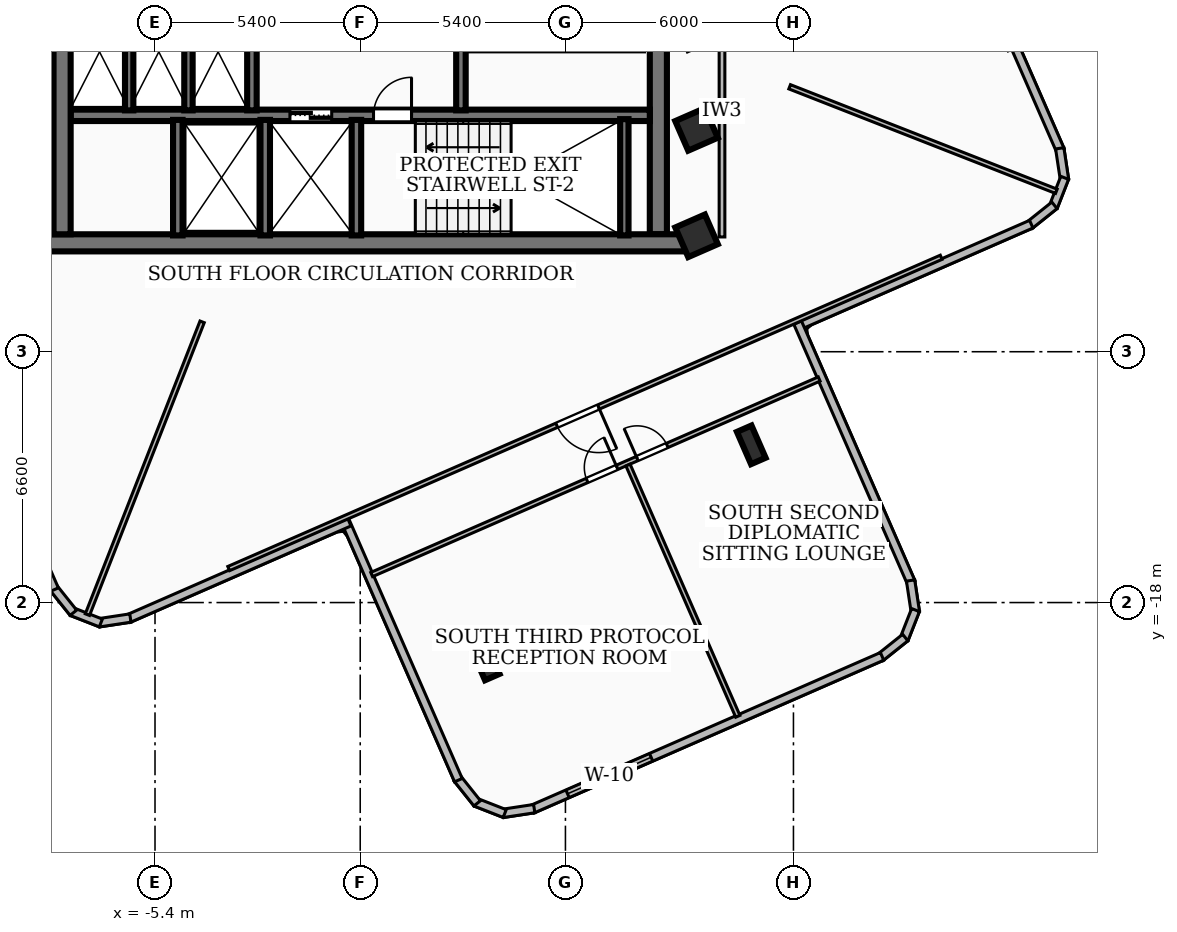
"""IFC4 building model, lengths in metres.
Left out: names, types, materials, properties, quantities, classifications, styles, units other than length and angle.
Written with IfcOpenShell. Run it as: python <this file> out.ifc"""

import sys

from ifc_helpers import new_model, si_unit, direction, frame, frame_2d, origin, origin_2d, place, context, subcontext, project, spatial, rectangle, i_section, extrude, element, fill, save


model = new_model("IFC4")
c1 = context("Model", 3, precision=1e-05, world=origin(), true_north=direction((0.0, 1.0)))
c2 = subcontext(c1, "Body", "Model", "MODEL_VIEW")
j1 = project(units=[si_unit("LENGTHUNIT", "METRE"), si_unit("PLANEANGLEUNIT", "RADIAN")], contexts=[c1])
p1 = place(None, origin())
s1 = spatial("IfcSite", under=j1, at=p1, CompositionType="ELEMENT")
p2 = place(p1, origin())
s2 = spatial("IfcBuilding", under=s1, at=p2, CompositionType="ELEMENT")
p3 = place(p2, frame((0.0, 0.0, 181.08)))
s3 = spatial("IfcBuildingStorey", under=s2, at=p3, CompositionType="ELEMENT", Elevation=181.08)
p4 = place(p3, frame((8.78, -8.535, 0.0), z_axis=(0.0, 0.0, 1.0), x_axis=(-1.0, 0.0, 0.0)))
e1 = element("IfcWall", 1, at=p4, inside=s3, PredefinedType="SHEAR", context=c2, shape_type="SweptSolid", body=[
    extrude(rectangle(XDim=17.56, YDim=0.45, at=frame_2d((8.78, 0.0))), origin(), (0.0, 0.0, 1.0), 3.34),
])
for number, where, z_axis, x_axis in (
    (2, (-7.845, -8.31, 0.0), (0.0, 0.0, 1.0), (0.0, 1.0, 0.0)),
    (3, (7.845, -1.975, 0.0), (0.0, 0.0, 1.0), (0.0, -1.0, 0.0)),
):
    element("IfcWall", number, at=place(p3, frame(where, z_axis=z_axis, x_axis=x_axis)), inside=s3, PredefinedType="SHEAR", context=c2, shape_type="SweptSolid", body=[
        extrude(rectangle(XDim=6.335, YDim=0.45, at=frame_2d((3.167, 0.0))), origin(), (0.0, 0.0, 1.0), 3.34),
    ])
p5 = place(p3, frame((-7.62, -5.18, 0.0), z_axis=(0.0, 0.0, 1.0), x_axis=(1.0, 0.0, 0.0)))
e4 = element("IfcWall", 4, at=p5, inside=s3, PredefinedType="SOLIDWALL", context=c2, shape_type="SweptSolid", body=[
    extrude(rectangle(XDim=15.24, YDim=0.3, at=frame_2d((7.62, 0.0))), origin(), (0.0, 0.0, 1.0), 3.34),
])
p6 = place(p5, frame((5.77, 0.0, 0.0)))
e5 = element("IfcOpeningElement", 5, at=p6, cuts=e4, PredefinedType="OPENING", context=c2, shape_type="SweptSolid", body=[
    extrude(rectangle(XDim=1.1, YDim=2.15, at=frame_2d((0.55, 1.075))), frame((0.0, 0.16, 0.0), z_axis=(0.0, -1.0, 0.0), x_axis=(1.0, 0.0, 0.0)), (0.0, 0.0, 1.0), 0.32),
])
p7 = place(p5, frame((7.97, 0.0, 0.0)))
e6 = element("IfcOpeningElement", 6, at=p7, cuts=e4, PredefinedType="OPENING", context=c2, shape_type="SweptSolid", body=[
    extrude(rectangle(XDim=1.0, YDim=2.1, at=frame_2d((0.5, 1.05))), frame((0.0, 0.16, 0.0), z_axis=(0.0, -1.0, 0.0), x_axis=(1.0, 0.0, 0.0)), (0.0, 0.0, 1.0), 0.32),
])
p8 = place(p3, frame((6.95, -8.34, 0.0), z_axis=(0.0, 0.0, 1.0), x_axis=(0.0, 1.0, 0.0)))
e7 = element("IfcWall", 7, at=p8, inside=s3, PredefinedType="SOLIDWALL", context=c2, shape_type="SweptSolid", body=[
    extrude(rectangle(XDim=3.06, YDim=0.22, at=frame_2d((1.53, 0.0))), origin(), (0.0, 0.0, 1.0), 3.34),
])
for number, where, z_axis, x_axis in (
    (8, (-0.1, -8.34, 0.0), (0.0, 0.0, 1.0), (0.0, 1.0, 0.0)),
    (9, (-2.5, -8.34, 0.0), (0.0, 0.0, 1.0), (0.0, 1.0, 0.0)),
    (10, (-4.8, -8.34, 0.0), (0.0, 0.0, 1.0), (0.0, 1.0, 0.0)),
):
    element("IfcWall", number, at=place(p3, frame(where, z_axis=z_axis, x_axis=x_axis)), inside=s3, PredefinedType="SOLIDWALL", context=c2, shape_type="SweptSolid", body=[
        extrude(rectangle(XDim=3.04, YDim=0.25, at=frame_2d((1.52, 0.0))), origin(), (0.0, 0.0, 1.0), 3.34),
    ])
for number, where, z_axis, x_axis in (
    (11, (-2.85, -5.05, 0.0), (0.0, 0.0, 1.0), (0.0, 1.0, 0.0)),
    (12, (2.65, -5.05, 0.0), (0.0, 0.0, 1.0), (0.0, 1.0, 0.0)),
):
    element("IfcWall", number, at=place(p3, frame(where, z_axis=z_axis, x_axis=x_axis)), inside=s3, PredefinedType="SOLIDWALL", context=c2, shape_type="SweptSolid", body=[
        extrude(rectangle(XDim=3.07, YDim=0.25, at=frame_2d((1.535, 0.0))), origin(), (0.0, 0.0, 1.0), 3.34),
    ])
for number, where, z_axis, x_axis in (
    (13, (-6.08, -5.05, 0.0), (0.0, 0.0, 1.0), (0.0, 1.0, 0.0)),
    (14, (-4.52, -5.05, 0.0), (0.0, 0.0, 1.0), (0.0, 1.0, 0.0)),
):
    element("IfcWall", number, at=place(p3, frame(where, z_axis=z_axis, x_axis=x_axis)), inside=s3, PredefinedType="SOLIDWALL", context=c2, shape_type="SweptSolid", body=[
        extrude(rectangle(XDim=3.07, YDim=0.22, at=frame_2d((1.535, 0.0))), origin(), (0.0, 0.0, 1.0), 3.34),
    ])
for number, where, z_axis, x_axis in (
    (15, (8.85, -5.55, 0.0), (0.0, 0.0, 1.0), (0.916, 0.4, 0.0)),
    (16, (8.85, -8.35, 0.0), (0.0, 0.0, 1.0), (0.916, 0.4, 0.0)),
):
    element("IfcColumn", number, at=place(p3, frame(where, z_axis=z_axis, x_axis=x_axis)), inside=s3, PredefinedType="COLUMN", context=c2, shape_type="SweptSolid", body=[
        extrude(rectangle(XDim=0.85, YDim=0.85, at=origin_2d()), origin(), (0.0, 0.0, 1.0), 3.6),
    ])
for number, where, z_axis, x_axis in (
    (17, (3.29, -19.536, 0.0), (0.0, 0.0, 1.0), (0.916, 0.4, 0.0)),
    (18, (10.29, -13.85, 0.0), (0.0, 0.0, 1.0), (0.916, 0.4, 0.0)),
):
    element("IfcColumn", number, at=place(p3, frame(where, z_axis=z_axis, x_axis=x_axis)), inside=s3, PredefinedType="COLUMN", context=c2, shape_type="SweptSolid", body=[
        extrude(i_section(OverallWidth=0.418, OverallDepth=0.927, WebThickness=0.019, FlangeThickness=0.032, at=origin_2d()), origin(), (0.0, 0.0, 1.0), 3.6),
    ])
p9 = place(p3, frame((15.883, -0.287, 0.0), z_axis=(0.0, 0.0, 1.0), x_axis=(0.400352069216, -0.916361402872, 0.0)))
e19 = element("IfcWall", 19, at=p9, inside=s3, PredefinedType="SOLIDWALL", context=c2, shape_type="SweptSolid", body=[
    extrude(rectangle(XDim=6.339, YDim=0.22, at=frame_2d((3.169, 0.0))), origin(), (0.0, 0.0, 1.0), 3.34),
])
p10 = place(p3, frame((18.407, -6.048, 0.0), z_axis=(0.0, 0.0, 1.0), x_axis=(0.149814047271, -0.988714190876, 0.0)))
e20 = element("IfcWall", 20, at=p10, inside=s3, PredefinedType="SOLIDWALL", context=c2, shape_type="SweptSolid", body=[
    extrude(rectangle(XDim=0.834, YDim=0.22, at=frame_2d((0.417, 0.0))), origin(), (0.0, 0.0, 1.0), 3.34),
])
p11 = place(p3, frame((18.537, -6.825, 0.0), z_axis=(0.0, 0.0, 1.0), x_axis=(-0.364331843435, -0.931269191941, 0.0)))
e21 = element("IfcWall", 21, at=p11, inside=s3, PredefinedType="SOLIDWALL", context=c2, shape_type="SweptSolid", body=[
    extrude(rectangle(XDim=0.818, YDim=0.22, at=frame_2d((0.409, 0.0))), origin(), (0.0, 0.0, 1.0), 3.34),
])
p12 = place(p3, frame((18.268, -7.548, 0.0), z_axis=(0.0, 0.0, 1.0), x_axis=(-0.781153625844, -0.624338860581, 0.0)))
e22 = element("IfcWall", 22, at=p12, inside=s3, PredefinedType="SOLIDWALL", context=c2, shape_type="SweptSolid", body=[
    extrude(rectangle(XDim=0.836, YDim=0.22, at=frame_2d((0.418, 0.0))), origin(), (0.0, 0.0, 1.0), 3.34),
])
p13 = place(p3, frame((17.658, -8.044, 0.0), z_axis=(0.0, 0.0, 1.0), x_axis=(-0.916361145567, -0.400352658158, 0.0)))
e23 = element("IfcWall", 23, at=p13, inside=s3, PredefinedType="SOLIDWALL", context=c2, shape_type="SweptSolid", body=[
    extrude(rectangle(XDim=6.759, YDim=0.22, at=frame_2d((3.38, 0.0))), origin(), (0.0, 0.0, 1.0), 3.34),
])
p14 = place(p3, frame((11.51, -10.634, 0.0), z_axis=(0.0, 0.0, 1.0), x_axis=(0.400392901903, -0.916343562266, 0.0)))
e24 = element("IfcWall", 24, at=p14, inside=s3, PredefinedType="SOLIDWALL", context=c2, shape_type="SweptSolid", body=[
    extrude(rectangle(XDim=7.458, YDim=0.22, at=frame_2d((3.729, 0.0))), origin(), (0.0, 0.0, 1.0), 3.34),
])
p15 = place(p3, frame((14.482, -17.42, 0.0), z_axis=(0.0, 0.0, 1.0), x_axis=(0.149597648238, -0.988746956325, 0.0)))
e25 = element("IfcWall", 25, at=p15, inside=s3, PredefinedType="SOLIDWALL", context=c2, shape_type="SweptSolid", body=[
    extrude(rectangle(XDim=0.836, YDim=0.22, at=frame_2d((0.418, 0.0))), origin(), (0.0, 0.0, 1.0), 3.34),
])
p16 = place(p3, frame((14.612, -18.198, 0.0), z_axis=(0.0, 0.0, 1.0), x_axis=(-0.365366290938, -0.93086383185, 0.0)))
e26 = element("IfcWall", 26, at=p16, inside=s3, PredefinedType="SOLIDWALL", context=c2, shape_type="SweptSolid", body=[
    extrude(rectangle(XDim=0.819, YDim=0.22, at=frame_2d((0.409, 0.0))), origin(), (0.0, 0.0, 1.0), 3.34),
])
p17 = place(p3, frame((14.342, -18.921, 0.0), z_axis=(0.0, 0.0, 1.0), x_axis=(-0.781723393747, -0.623625316731, 0.0)))
e27 = element("IfcWall", 27, at=p17, inside=s3, PredefinedType="SOLIDWALL", context=c2, shape_type="SweptSolid", body=[
    extrude(rectangle(XDim=0.835, YDim=0.22, at=frame_2d((0.418, 0.0))), origin(), (0.0, 0.0, 1.0), 3.34),
])
p18 = place(p3, frame((13.732, -19.416, 0.0), z_axis=(0.0, 0.0, 1.0), x_axis=(-0.916354214502, -0.400368522196, 0.0)))
e28 = element("IfcWall", 28, at=p18, inside=s3, PredefinedType="SOLIDWALL", context=c2, shape_type="SweptSolid", body=[
    extrude(rectangle(XDim=10.041, YDim=0.22, at=frame_2d((5.021, 0.0))), origin(), (0.0, 0.0, 1.0), 3.34),
])
p19 = place(p18, frame((6.632, 0.0, 0.85)))
e29 = element("IfcOpeningElement", 29, at=p19, cuts=e28, PredefinedType="OPENING", context=c2, shape_type="SweptSolid", body=[
    extrude(rectangle(XDim=2.4, YDim=1.65, at=frame_2d((1.2, 0.825))), frame((0.0, 0.12, 0.0), z_axis=(0.0, -1.0, 0.0), x_axis=(1.0, 0.0, 0.0)), (0.0, 0.0, 1.0), 0.24),
])
p20 = place(p3, frame((4.579, -23.422, 0.0), z_axis=(0.0, 0.0, 1.0), x_axis=(-0.98872075534, -0.149770717969, 0.0)))
e30 = element("IfcWall", 30, at=p20, inside=s3, PredefinedType="SOLIDWALL", context=c2, shape_type="SweptSolid", body=[
    extrude(rectangle(XDim=0.835, YDim=0.22, at=frame_2d((0.417, 0.0))), origin(), (0.0, 0.0, 1.0), 3.34),
])
p21 = place(p3, frame((3.802, -23.552, 0.0), z_axis=(0.0, 0.0, 1.0), x_axis=(-0.931427357551, 0.363927297142, 0.0)))
e31 = element("IfcWall", 31, at=p21, inside=s3, PredefinedType="SOLIDWALL", context=c2, shape_type="SweptSolid", body=[
    extrude(rectangle(XDim=0.819, YDim=0.22, at=frame_2d((0.41, 0.0))), origin(), (0.0, 0.0, 1.0), 3.34),
])
p22 = place(p3, frame((3.078, -23.283, 0.0), z_axis=(0.0, 0.0, 1.0), x_axis=(-0.623625316731, 0.781723393747, 0.0)))
e32 = element("IfcWall", 32, at=p22, inside=s3, PredefinedType="SOLIDWALL", context=c2, shape_type="SweptSolid", body=[
    extrude(rectangle(XDim=0.835, YDim=0.22, at=frame_2d((0.418, 0.0))), origin(), (0.0, 0.0, 1.0), 3.34),
])
p23 = place(p3, frame((2.583, -22.673, 0.0), z_axis=(0.0, 0.0, 1.0), x_axis=(-0.400284831799, 0.916390775505, 0.0)))
e33 = element("IfcWall", 33, at=p23, inside=s3, PredefinedType="SOLIDWALL", context=c2, shape_type="SweptSolid", body=[
    extrude(rectangle(XDim=7.46, YDim=0.22, at=frame_2d((3.73, 0.0))), origin(), (0.0, 0.0, 1.0), 3.34),
])
p24 = place(p3, frame((-0.287, -15.883, 0.0), z_axis=(0.0, 0.0, 1.0), x_axis=(-0.916361402872, -0.400352069216, 0.0)))
e34 = element("IfcWall", 34, at=p24, inside=s3, PredefinedType="SOLIDWALL", context=c2, shape_type="SweptSolid", body=[
    extrude(rectangle(XDim=6.339, YDim=0.22, at=frame_2d((3.169, 0.0))), origin(), (0.0, 0.0, 1.0), 3.34),
])
p25 = place(p3, frame((-6.048, -18.407, 0.0), z_axis=(0.0, 0.0, 1.0), x_axis=(-0.988714190876, -0.149814047271, 0.0)))
e35 = element("IfcWall", 35, at=p25, inside=s3, PredefinedType="SOLIDWALL", context=c2, shape_type="SweptSolid", body=[
    extrude(rectangle(XDim=0.834, YDim=0.22, at=frame_2d((0.417, 0.0))), origin(), (0.0, 0.0, 1.0), 3.34),
])
p26 = place(p3, frame((-6.825, -18.537, 0.0), z_axis=(0.0, 0.0, 1.0), x_axis=(-0.931269191941, 0.364331843435, 0.0)))
e36 = element("IfcWall", 36, at=p26, inside=s3, PredefinedType="SOLIDWALL", context=c2, shape_type="SweptSolid", body=[
    extrude(rectangle(XDim=0.818, YDim=0.22, at=frame_2d((0.409, 0.0))), origin(), (0.0, 0.0, 1.0), 3.34),
])
p27 = place(p3, frame((-7.548, -18.268, 0.0), z_axis=(0.0, 0.0, 1.0), x_axis=(-0.624338860581, 0.781153625844, 0.0)))
e37 = element("IfcWall", 37, at=p27, inside=s3, PredefinedType="SOLIDWALL", context=c2, shape_type="SweptSolid", body=[
    extrude(rectangle(XDim=0.836, YDim=0.22, at=frame_2d((0.418, 0.0))), origin(), (0.0, 0.0, 1.0), 3.34),
])
p28 = place(p3, frame((-8.044, -17.658, 0.0), z_axis=(0.0, 0.0, 1.0), x_axis=(-0.400352658158, 0.916361145567, 0.0)))
e38 = element("IfcWall", 38, at=p28, inside=s3, PredefinedType="SOLIDWALL", context=c2, shape_type="SweptSolid", body=[
    extrude(rectangle(XDim=6.759, YDim=0.22, at=frame_2d((3.38, 0.0))), origin(), (0.0, 0.0, 1.0), 3.34),
])
p29 = place(p3, frame((9.52, -8.38, 0.0), z_axis=(0.0, 0.0, 1.0), x_axis=(0.0, 1.0, 0.0)))
e39 = element("IfcWall", 39, at=p29, inside=s3, PredefinedType="PARTITIONING", context=c2, shape_type="SweptSolid", body=[
    extrude(rectangle(XDim=6.63, YDim=0.15, at=frame_2d((3.315, 0.0))), origin(), (0.0, 0.0, 1.0), 3.34),
])
p30 = place(p3, frame((-4.16, -10.614, 0.0), z_axis=(0.0, 0.0, 1.0), x_axis=(-0.364859873544, -0.931062442953, 0.0)))
e40 = element("IfcWall", 40, at=p30, inside=s3, PredefinedType="PARTITIONING", context=c2, shape_type="SweptSolid", body=[
    extrude(rectangle(XDim=8.274, YDim=0.12, at=frame_2d((4.137, 0.0))), origin(), (0.0, 0.0, 1.0), 3.34),
])
p31 = place(p3, frame((11.3, -4.429, 0.0), z_axis=(0.0, 0.0, 1.0), x_axis=(0.931071596241, -0.364836514995, 0.0)))
e41 = element("IfcWall", 41, at=p31, inside=s3, PredefinedType="PARTITIONING", context=c2, shape_type="SweptSolid", body=[
    extrude(rectangle(XDim=7.538, YDim=0.12, at=frame_2d((3.769, 0.0))), origin(), (0.0, 0.0, 1.0), 3.34),
])
p32 = place(p3, frame((15.288, -8.915, 0.0), z_axis=(0.0, 0.0, 1.0), x_axis=(-0.916368627962, -0.400335531383, 0.0)))
e42 = element("IfcWall", 42, at=p32, inside=s3, PredefinedType="PARTITIONING", context=c2, shape_type="SweptSolid", body=[
    extrude(rectangle(XDim=20.46, YDim=0.12, at=frame_2d((10.23, 0.0))), origin(), (0.0, 0.0, 1.0), 2.644),
])
p33 = place(p32, frame((9.84, 0.0, 0.0)))
e43 = element("IfcOpeningElement", 43, at=p33, cuts=e42, PredefinedType="OPENING", context=c2, shape_type="SweptSolid", body=[
    extrude(rectangle(XDim=1.2, YDim=2.1, at=frame_2d((0.6, 1.05))), frame((0.0, 0.07, 0.0), z_axis=(0.0, -1.0, 0.0), x_axis=(1.0, 0.0, 0.0)), (0.0, 0.0, 1.0), 0.14),
])
p34 = place(p3, frame((7.047, -14.382, 0.0), z_axis=(0.0, 0.0, 1.0), x_axis=(0.400431798825, -0.916326565417, 0.0)))
e44 = element("IfcWall", 44, at=p34, inside=s3, PredefinedType="PARTITIONING", context=c2, shape_type="SweptSolid", body=[
    extrude(rectangle(XDim=7.215, YDim=0.12, at=frame_2d((3.607, 0.0))), origin(), (0.0, 0.0, 1.0), 3.34),
])
p35 = place(p3, frame((0.301, -17.263, 0.0), z_axis=(0.0, 0.0, 1.0), x_axis=(0.916355177322, 0.400366318507, 0.0)))
e45 = element("IfcWall", 45, at=p35, inside=s3, PredefinedType="PARTITIONING", context=c2, shape_type="SweptSolid", body=[
    extrude(rectangle(XDim=12.851, YDim=0.12, at=frame_2d((6.425, 0.0))), origin(), (0.0, 0.0, 1.0), 2.644),
])
p36 = place(p35, frame((6.185, 0.0, 0.0)))
e46 = element("IfcOpeningElement", 46, at=p36, cuts=e45, PredefinedType="OPENING", context=c2, shape_type="SweptSolid", body=[
    extrude(rectangle(XDim=0.86, YDim=2.04, at=frame_2d((0.43, 1.02))), frame((0.0, 0.07, 0.0), z_axis=(0.0, -1.0, 0.0), x_axis=(1.0, 0.0, 0.0)), (0.0, 0.0, 1.0), 0.14),
])
p37 = place(p35, frame((7.625, 0.0, 0.0)))
e47 = element("IfcOpeningElement", 47, at=p37, cuts=e45, PredefinedType="OPENING", context=c2, shape_type="SweptSolid", body=[
    extrude(rectangle(XDim=0.86, YDim=2.04, at=frame_2d((0.43, 1.02))), frame((0.0, 0.07, 0.0), z_axis=(0.0, -1.0, 0.0), x_axis=(1.0, 0.0, 0.0)), (0.0, 0.0, 1.0), 0.14),
])
p38 = place(p19, origin())
e48 = element("IfcWindow", 48, at=p38, inside=s3, PartitioningType="SINGLE_PANEL", PredefinedType="WINDOW", context=c2, shape_type="SweptSolid", body=[
    extrude(rectangle(XDim=2.4, YDim=1.65, at=frame_2d((1.2, 0.825))), frame((0.0, 0.03, 0.0), z_axis=(0.0, -1.0, 0.0), x_axis=(1.0, 0.0, 0.0)), (0.0, 0.0, 1.0), 0.06),
])
fill(e29, e48)
p39 = place(p6, origin())
e49 = element("IfcDoor", 49, at=p39, inside=s3, OperationType="DOUBLE_DOOR_SLIDING", PredefinedType="DOOR", context=c2, shape_type="SweptSolid", body=[
    extrude(rectangle(XDim=1.1, YDim=2.15, at=frame_2d((0.55, 1.075))), frame((0.0, 0.025, 0.0), z_axis=(0.0, -1.0, 0.0), x_axis=(1.0, 0.0, 0.0)), (0.0, 0.0, 1.0), 0.05),
])
fill(e5, e49)
p40 = place(p7, origin())
e50 = element("IfcDoor", 50, at=p40, inside=s3, OperationType="SINGLE_SWING_RIGHT", PredefinedType="DOOR", context=c2, shape_type="SweptSolid", body=[
    extrude(rectangle(XDim=1.0, YDim=2.1, at=frame_2d((0.5, 1.05))), frame((0.0, 0.025, 0.0), z_axis=(0.0, -1.0, 0.0), x_axis=(1.0, 0.0, 0.0)), (0.0, 0.0, 1.0), 0.05),
])
fill(e6, e50)
p41 = place(p33, origin())
e51 = element("IfcDoor", 51, at=p41, inside=s3, OperationType="SINGLE_SWING_LEFT", PredefinedType="DOOR", context=c2, shape_type="SweptSolid", body=[
    extrude(rectangle(XDim=1.2, YDim=2.1, at=frame_2d((0.6, 1.05))), frame((0.0, 0.025, 0.0), z_axis=(0.0, -1.0, 0.0), x_axis=(1.0, 0.0, 0.0)), (0.0, 0.0, 1.0), 0.05),
])
fill(e43, e51)
p42 = place(p36, origin())
e52 = element("IfcDoor", 52, at=p42, inside=s3, OperationType="SINGLE_SWING_RIGHT", PredefinedType="DOOR", context=c2, shape_type="SweptSolid", body=[
    extrude(rectangle(XDim=0.86, YDim=2.04, at=frame_2d((0.43, 1.02))), frame((0.0, 0.025, 0.0), z_axis=(0.0, -1.0, 0.0), x_axis=(1.0, 0.0, 0.0)), (0.0, 0.0, 1.0), 0.05),
])
fill(e46, e52)
p43 = place(p37, origin())
e53 = element("IfcDoor", 53, at=p43, inside=s3, OperationType="SINGLE_SWING_LEFT", PredefinedType="DOOR", context=c2, shape_type="SweptSolid", body=[
    extrude(rectangle(XDim=0.86, YDim=2.04, at=frame_2d((0.43, 1.02))), frame((0.0, 0.025, 0.0), z_axis=(0.0, -1.0, 0.0), x_axis=(1.0, 0.0, 0.0)), (0.0, 0.0, 1.0), 0.05),
])
fill(e47, e53)
save(model, sys.argv[1])
